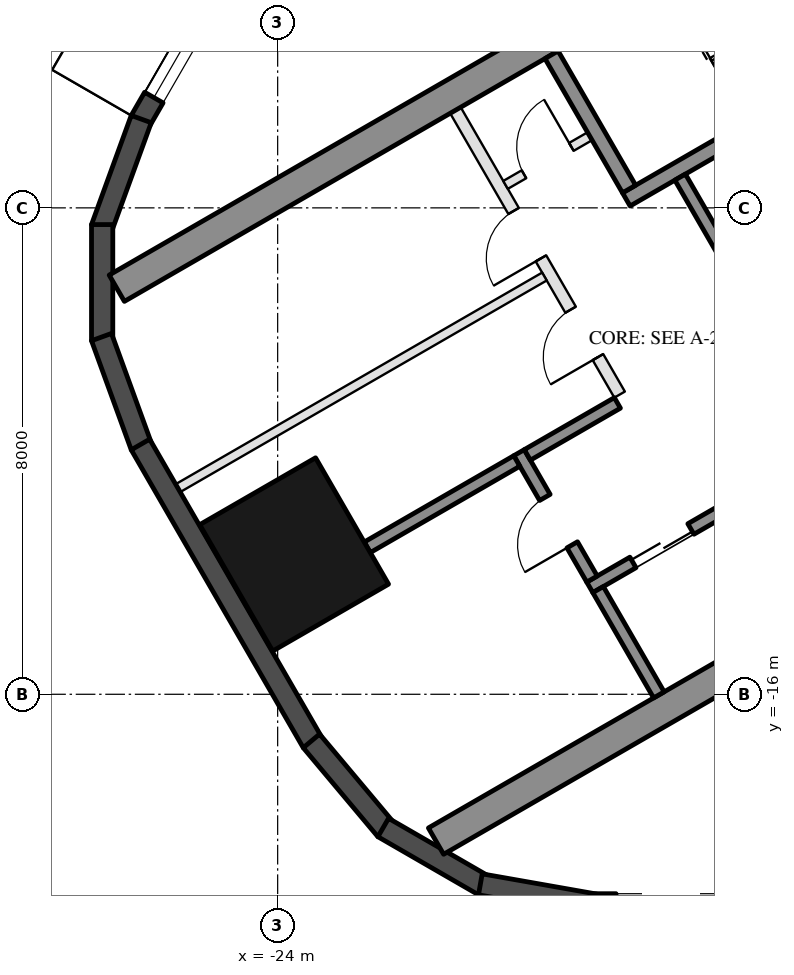
"""IFC4 building model, lengths in metres.
Left out: names, types, materials, properties, quantities, classifications, styles, units other than length and angle.
Written with IfcOpenShell. Run it as: python <this file> out.ifc"""

import sys

from ifc_helpers import new_model, si_unit, direction, frame, frame_2d, origin, origin_2d, place, context, subcontext, project, spatial, rectangle, hollow_rectangle, extrude, element, fill, save


model = new_model("IFC4")
c1 = context("Model", 3, precision=1e-05, world=origin(), true_north=direction((0.0, 1.0)))
c2 = subcontext(c1, "Body", "Model", "MODEL_VIEW")
j1 = project(units=[si_unit("LENGTHUNIT", "METRE"), si_unit("PLANEANGLEUNIT", "RADIAN")], contexts=[c1])
p1 = place(None, origin())
s1 = spatial("IfcSite", under=j1, at=p1, CompositionType="ELEMENT")
p2 = place(p1, origin())
s2 = spatial("IfcBuilding", under=s1, at=p2, CompositionType="ELEMENT")
p3 = place(p2, frame((0.0, 0.0, 179.9)))
s3 = spatial("IfcBuildingStorey", under=s2, at=p3, CompositionType="ELEMENT", Elevation=179.9)
p4 = place(p3, frame((-23.729, -13.7, 0.0), z_axis=(0.0, 0.0, 1.0), x_axis=(-0.5, 0.866025403784, 0.0)))
e1 = element("IfcColumn", 1, at=p4, inside=s3, PredefinedType="COLUMN", context=c2, shape_type="SweptSolid", body=[
    extrude(hollow_rectangle(XDim=2.4, YDim=2.2, WallThickness=0.06, at=origin_2d()), origin(), (0.0, 0.0, 1.0), 3.7),
])
p5 = place(p3, frame((-24.299, -3.176, 0.0), z_axis=(0.0, 0.0, 1.0), x_axis=(-0.500028278809, -0.866009076391, 0.0)))
e2 = element("IfcWall", 2, at=p5, inside=s3, PredefinedType="SOLIDWALL", context=c2, shape_type="SweptSolid", body=[
    extrude(rectangle(XDim=3.916, YDim=0.35, at=frame_2d((1.958, 0.0))), origin(), (0.0, 0.0, 1.0), 3.55),
])
p6 = place(p5, frame((1.675, 0.0, 0.3)))
e3 = element("IfcOpeningElement", 3, at=p6, cuts=e2, PredefinedType="OPENING", context=c2, shape_type="SweptSolid", body=[
    extrude(rectangle(XDim=1.8, YDim=2.65, at=frame_2d((0.9, 1.325))), frame((0.0, 0.185, 0.0), z_axis=(0.0, -1.0, 0.0), x_axis=(1.0, 0.0, 0.0)), (0.0, 0.0, 1.0), 0.37),
])
for number, where, z_axis, x_axis in (
    (4, (-26.244, -6.54, 0.0), (0.0, 0.0, 1.0), (-0.342, -0.94, 0.0)),
    (5, (-26.886, -8.275, 0.0), (0.0, 0.0, 1.0), (0.0, -1.0, 0.0)),
    (6, (-26.897, -10.125, 0.0), (0.0, 0.0, 1.0), (0.342, -0.94, 0.0)),
):
    element("IfcWall", number, at=place(p3, frame(where, z_axis=z_axis, x_axis=x_axis)), inside=s3, PredefinedType="SOLIDWALL", context=c2, shape_type="SweptSolid", body=[
        extrude(rectangle(XDim=1.91, YDim=0.35, at=frame_2d((0.955, 0.0))), origin(), (0.0, 0.0, 1.0), 3.55),
    ])
p7 = place(p3, frame((-26.257, -11.893, 0.0), z_axis=(0.0, 0.0, 1.0), x_axis=(0.500018773155, -0.866014564827, 0.0)))
e7 = element("IfcWall", 7, at=p7, inside=s3, PredefinedType="SOLIDWALL", context=c2, shape_type="SweptSolid", body=[
    extrude(rectangle(XDim=5.658, YDim=0.35, at=frame_2d((2.829, 0.0))), origin(), (0.0, 0.0, 1.0), 3.55),
])
for number, where, z_axis, x_axis in (
    (8, (-23.445, -16.768, 0.0), (0.0, 0.0, 1.0), (0.643, -0.766, 0.0)),
    (9, (-22.264, -18.192, 0.0), (0.0, 0.0, 1.0), (0.866, -0.5, 0.0)),
):
    element("IfcWall", number, at=place(p3, frame(where, z_axis=z_axis, x_axis=x_axis)), inside=s3, PredefinedType="SOLIDWALL", context=c2, shape_type="SweptSolid", body=[
        extrude(rectangle(XDim=1.91, YDim=0.35, at=frame_2d((0.955, 0.0))), origin(), (0.0, 0.0, 1.0), 3.55),
    ])
p8 = place(p3, frame((-20.667, -19.126, 0.0), z_axis=(0.0, 0.0, 1.0), x_axis=(0.984798995425, -0.173697837091, 0.0)))
e10 = element("IfcWall", 10, at=p8, inside=s3, PredefinedType="SOLIDWALL", context=c2, shape_type="SweptSolid", body=[
    extrude(rectangle(XDim=1.91, YDim=0.35, at=frame_2d((0.955, 0.0))), origin(), (0.0, 0.0, 1.0), 3.55),
])
p9 = place(p3, frame((-18.816, -19.455, 0.0), z_axis=(0.0, 0.0, 1.0), x_axis=(1.0, 0.0, 0.0)))
e11 = element("IfcWall", 11, at=p9, inside=s3, PredefinedType="SOLIDWALL", context=c2, shape_type="SweptSolid", body=[
    extrude(rectangle(XDim=11.816, YDim=0.35, at=frame_2d((5.908, 0.0))), origin(), (0.0, 0.0, 1.0), 3.55),
])
p10 = place(p9, frame((0.381, 0.0, 0.3)))
e12 = element("IfcOpeningElement", 12, at=p10, cuts=e11, PredefinedType="OPENING", context=c2, shape_type="SweptSolid", body=[
    extrude(rectangle(XDim=1.8, YDim=2.65, at=frame_2d((0.9, 1.325))), frame((0.0, 0.185, 0.0), z_axis=(0.0, -1.0, 0.0), x_axis=(1.0, 0.0, 0.0)), (0.0, 0.0, 1.0), 0.37),
])
p11 = place(p9, frame((7.74, 0.0, 0.0)))
e13 = element("IfcOpeningElement", 13, at=p11, cuts=e11, PredefinedType="OPENING", context=c2, shape_type="SweptSolid", body=[
    extrude(rectangle(XDim=2.4, YDim=2.4, at=frame_2d((1.2, 1.2))), frame((0.0, 0.185, 0.0), z_axis=(0.0, -1.0, 0.0), x_axis=(1.0, 0.0, 0.0)), (0.0, 0.0, 1.0), 0.37),
])
p12 = place(p9, frame((3.791, 0.0, 0.3)))
e14 = element("IfcOpeningElement", 14, at=p12, cuts=e11, PredefinedType="OPENING", context=c2, shape_type="SweptSolid", body=[
    extrude(rectangle(XDim=1.6, YDim=2.65, at=frame_2d((0.8, 1.325))), frame((0.0, 0.185, 0.0), z_axis=(0.0, -1.0, 0.0), x_axis=(1.0, 0.0, 0.0)), (0.0, 0.0, 1.0), 0.37),
])
p13 = place(p9, frame((5.691, 0.0, 0.3)))
e15 = element("IfcOpeningElement", 15, at=p13, cuts=e11, PredefinedType="OPENING", context=c2, shape_type="SweptSolid", body=[
    extrude(rectangle(XDim=1.6, YDim=2.65, at=frame_2d((0.8, 1.325))), frame((0.0, 0.185, 0.0), z_axis=(0.0, -1.0, 0.0), x_axis=(1.0, 0.0, 0.0)), (0.0, 0.0, 1.0), 0.37),
])
for number, where, z_axis, x_axis in (
    (16, (-13.797, -1.903, 0.0), (0.0, 0.0, 1.0), (-0.866, -0.5, 0.0)),
    (17, (-8.547, -10.997, 0.0), (0.0, 0.0, 1.0), (-0.866, -0.5, 0.0)),
):
    element("IfcWall", number, at=place(p3, frame(where, z_axis=z_axis, x_axis=x_axis)), inside=s3, PredefinedType="SHEAR", context=c2, shape_type="SweptSolid", body=[
        extrude(rectangle(XDim=14.837, YDim=0.5, at=frame_2d((7.418, 0.0))), origin(), (0.0, 0.0, 1.0), 3.5),
    ])
p14 = place(p3, frame((-12.681, -4.636, 0.0), z_axis=(0.0, 0.0, 1.0), x_axis=(-0.866021702275, -0.500006411147, 0.0)))
e18 = element("IfcWall", 18, at=p14, inside=s3, PredefinedType="SHEAR", context=c2, shape_type="SweptSolid", body=[
    extrude(rectangle(XDim=6.45, YDim=0.25, at=frame_2d((3.225, 0.0))), origin(), (0.0, 0.0, 1.0), 3.5),
])
p15 = place(p14, frame((0.3, 0.0, 0.0)))
e19 = element("IfcOpeningElement", 19, at=p15, cuts=e18, PredefinedType="OPENING", context=c2, shape_type="SweptSolid", body=[
    extrude(rectangle(XDim=1.0, YDim=2.1, at=frame_2d((0.5, 1.05))), frame((0.0, 0.135, 0.0), z_axis=(0.0, -1.0, 0.0), x_axis=(1.0, 0.0, 0.0)), (0.0, 0.0, 1.0), 0.27),
])
p16 = place(p3, frame((-19.496, -5.482, 0.0), z_axis=(0.0, 0.0, 1.0), x_axis=(0.499990435942, -0.866030925526, 0.0)))
e20 = element("IfcWall", 20, at=p16, inside=s3, PredefinedType="SHEAR", context=c2, shape_type="SweptSolid", body=[
    extrude(rectangle(XDim=2.55, YDim=0.25, at=frame_2d((1.275, 0.0))), origin(), (0.0, 0.0, 1.0), 3.5),
])
p17 = place(p3, frame((-17.381, -7.495, 0.0), z_axis=(0.0, 0.0, 1.0), x_axis=(0.500011755427, -0.866018616679, 0.0)))
e21 = element("IfcWall", 21, at=p17, inside=s3, PredefinedType="SHEAR", context=c2, shape_type="SweptSolid", body=[
    extrude(rectangle(XDim=2.8, YDim=0.2, at=frame_2d((1.4, 0.0))), origin(), (0.0, 0.0, 1.0), 3.5),
])
p18 = place(p3, frame((-10.068, -9.162, 0.0), z_axis=(0.0, 0.0, 1.0), x_axis=(-0.866032725843, -0.499987317609, 0.0)))
e22 = element("IfcWall", 22, at=p18, inside=s3, PredefinedType="SHEAR", context=c2, shape_type="SweptSolid", body=[
    extrude(rectangle(XDim=10.16, YDim=0.2, at=frame_2d((5.08, 0.0))), origin(), (0.0, 0.0, 1.0), 3.5),
])
p19 = place(p18, frame((0.62, 0.0, 0.0)))
e23 = element("IfcOpeningElement", 23, at=p19, cuts=e22, PredefinedType="OPENING", context=c2, shape_type="SweptSolid", body=[
    extrude(rectangle(XDim=1.1, YDim=2.1, at=frame_2d((0.55, 1.05))), frame((0.0, 0.11, 0.0), z_axis=(0.0, -1.0, 0.0), x_axis=(1.0, 0.0, 0.0)), (0.0, 0.0, 1.0), 0.22),
])
p20 = place(p18, frame((3.16, 0.0, 0.0)))
e24 = element("IfcOpeningElement", 24, at=p20, cuts=e22, PredefinedType="OPENING", context=c2, shape_type="SweptSolid", body=[
    extrude(rectangle(XDim=1.1, YDim=2.1, at=frame_2d((0.55, 1.05))), frame((0.0, 0.11, 0.0), z_axis=(0.0, -1.0, 0.0), x_axis=(1.0, 0.0, 0.0)), (0.0, 0.0, 1.0), 0.22),
])
p21 = place(p18, frame((5.7, 0.0, 0.0)))
e25 = element("IfcOpeningElement", 25, at=p21, cuts=e22, PredefinedType="OPENING", context=c2, shape_type="SweptSolid", body=[
    extrude(rectangle(XDim=1.1, YDim=2.1, at=frame_2d((0.55, 1.05))), frame((0.0, 0.11, 0.0), z_axis=(0.0, -1.0, 0.0), x_axis=(1.0, 0.0, 0.0)), (0.0, 0.0, 1.0), 0.22),
])
p22 = place(p18, frame((8.24, 0.0, 0.0)))
e26 = element("IfcOpeningElement", 26, at=p22, cuts=e22, PredefinedType="OPENING", context=c2, shape_type="SweptSolid", body=[
    extrude(rectangle(XDim=1.1, YDim=2.1, at=frame_2d((0.55, 1.05))), frame((0.0, 0.11, 0.0), z_axis=(0.0, -1.0, 0.0), x_axis=(1.0, 0.0, 0.0)), (0.0, 0.0, 1.0), 0.22),
])
p23 = place(p3, frame((-20.031, -12.026, 0.0), z_axis=(0.0, 0.0, 1.0), x_axis=(0.500033551112, -0.866006032174, 0.0)))
e27 = element("IfcWall", 27, at=p23, inside=s3, PredefinedType="SHEAR", context=c2, shape_type="SweptSolid", body=[
    extrude(rectangle(XDim=2.4, YDim=0.2, at=frame_2d((1.2, 0.0))), origin(), (0.0, 0.0, 1.0), 3.5),
])
p24 = place(p23, frame((0.85, 0.0, 0.0)))
e28 = element("IfcOpeningElement", 28, at=p24, cuts=e27, PredefinedType="OPENING", context=c2, shape_type="SweptSolid", body=[
    extrude(rectangle(XDim=0.9, YDim=2.1, at=frame_2d((0.45, 1.05))), frame((0.0, 0.11, 0.0), z_axis=(0.0, -1.0, 0.0), x_axis=(1.0, 0.0, 0.0)), (0.0, 0.0, 1.0), 0.22),
])
p25 = place(p3, frame((-18.413, -11.208, 0.0), z_axis=(0.0, 0.0, 1.0), x_axis=(-0.866038183914, -0.499977863513, 0.0)))
e29 = element("IfcWall", 29, at=p25, inside=s3, PredefinedType="SHEAR", context=c2, shape_type="SweptSolid", body=[
    extrude(rectangle(XDim=1.71, YDim=0.2, at=frame_2d((0.855, 0.0))), origin(), (0.0, 0.0, 1.0), 3.5),
])
p26 = place(p3, frame((-18.73, -14.278, 0.0), z_axis=(0.0, 0.0, 1.0), x_axis=(0.50002537861, -0.866010750942, 0.0)))
e30 = element("IfcWall", 30, at=p26, inside=s3, PredefinedType="SHEAR", context=c2, shape_type="SweptSolid", body=[
    extrude(rectangle(XDim=2.0, YDim=0.2, at=frame_2d((1.0, 0.0))), origin(), (0.0, 0.0, 1.0), 3.5),
])
p27 = place(p3, frame((-20.067, -12.163, 0.0), z_axis=(0.0, 0.0, 1.0), x_axis=(-0.866055327414, -0.49994816717, 0.0)))
e31 = element("IfcWall", 31, at=p27, inside=s3, PredefinedType="SHEAR", context=c2, shape_type="SweptSolid", body=[
    extrude(rectangle(XDim=2.84, YDim=0.2, at=frame_2d((1.42, 0.0))), origin(), (0.0, 0.0, 1.0), 3.5),
])
p28 = place(p3, frame((-21.076, -6.395, 0.0), z_axis=(0.0, 0.0, 1.0), x_axis=(0.50001468107, -0.866016927499, 0.0)))
e32 = element("IfcWall", 32, at=p28, inside=s3, PredefinedType="PARTITIONING", context=c2, shape_type="SweptSolid", body=[
    extrude(rectangle(XDim=5.4, YDim=0.2, at=frame_2d((2.7, 0.0))), origin(), (0.0, 0.0, 1.0), 3.5),
])
p29 = place(p28, frame((1.913, 0.0, 0.0)))
e33 = element("IfcOpeningElement", 33, at=p29, cuts=e32, PredefinedType="OPENING", context=c2, shape_type="SweptSolid", body=[
    extrude(rectangle(XDim=0.9, YDim=2.1, at=frame_2d((0.45, 1.05))), frame((0.0, 0.11, 0.0), z_axis=(0.0, -1.0, 0.0), x_axis=(1.0, 0.0, 0.0)), (0.0, 0.0, 1.0), 0.22),
])
p30 = place(p28, frame((3.788, 0.0, 0.0)))
e34 = element("IfcOpeningElement", 34, at=p30, cuts=e32, PredefinedType="OPENING", context=c2, shape_type="SweptSolid", body=[
    extrude(rectangle(XDim=0.9, YDim=2.1, at=frame_2d((0.45, 1.05))), frame((0.0, 0.11, 0.0), z_axis=(0.0, -1.0, 0.0), x_axis=(1.0, 0.0, 0.0)), (0.0, 0.0, 1.0), 0.22),
])
p31 = place(p3, frame((-18.866, -6.822, 0.0), z_axis=(0.0, 0.0, 1.0), x_axis=(-0.866028054938, -0.499995408039, 0.0)))
e35 = element("IfcWall", 35, at=p31, inside=s3, PredefinedType="PARTITIONING", context=c2, shape_type="SweptSolid", body=[
    extrude(rectangle(XDim=1.6, YDim=0.15, at=frame_2d((0.8, 0.0))), origin(), (0.0, 0.0, 1.0), 3.5),
])
p32 = place(p31, frame((0.35, 0.0, 0.0)))
e36 = element("IfcOpeningElement", 36, at=p32, cuts=e35, PredefinedType="OPENING", context=c2, shape_type="SweptSolid", body=[
    extrude(rectangle(XDim=0.9, YDim=2.1, at=frame_2d((0.45, 1.05))), frame((0.0, 0.085, 0.0), z_axis=(0.0, -1.0, 0.0), x_axis=(1.0, 0.0, 0.0)), (0.0, 0.0, 1.0), 0.17),
])
p33 = place(p3, frame((-19.613, -9.13, 0.0), z_axis=(0.0, 0.0, 1.0), x_axis=(-0.866031734426, -0.499989034847, 0.0)))
e37 = element("IfcWall", 37, at=p33, inside=s3, PredefinedType="PARTITIONING", context=c2, shape_type="SweptSolid", body=[
    extrude(rectangle(XDim=6.95, YDim=0.15, at=frame_2d((3.475, 0.0))), origin(), (0.0, 0.0, 1.0), 3.5),
])
p34 = place(p6, origin())
e38 = element("IfcWindow", 38, at=p34, inside=s3, PartitioningType="SINGLE_PANEL", PredefinedType="WINDOW", context=c2, shape_type="SweptSolid", body=[
    extrude(rectangle(XDim=1.8, YDim=2.65, at=frame_2d((0.9, 1.325))), frame((0.0, 0.03, 0.0), z_axis=(0.0, -1.0, 0.0), x_axis=(1.0, 0.0, 0.0)), (0.0, 0.0, 1.0), 0.06),
])
fill(e3, e38)
p35 = place(p32, frame((0.9, 0.0, 0.0), z_axis=(0.0, 0.0, 1.0), x_axis=(-1.0, 0.0, 0.0)))
e39 = element("IfcDoor", 39, at=p35, inside=s3, OperationType="SINGLE_SWING_RIGHT", PredefinedType="DOOR", context=c2, shape_type="SweptSolid", body=[
    extrude(rectangle(XDim=0.9, YDim=2.1, at=frame_2d((0.45, 1.05))), frame((0.0, 0.025, 0.0), z_axis=(0.0, -1.0, 0.0), x_axis=(1.0, 0.0, 0.0)), (0.0, 0.0, 1.0), 0.05),
])
fill(e36, e39)
p36 = place(p22, origin())
e40 = element("IfcDoor", 40, at=p36, inside=s3, OperationType="DOUBLE_DOOR_SLIDING", PredefinedType="DOOR", context=c2, shape_type="SweptSolid", body=[
    extrude(rectangle(XDim=1.1, YDim=2.1, at=frame_2d((0.55, 1.05))), frame((0.0, 0.025, 0.0), z_axis=(0.0, -1.0, 0.0), x_axis=(1.0, 0.0, 0.0)), (0.0, 0.0, 1.0), 0.05),
])
fill(e26, e40)
p37 = place(p24, frame((0.9, 0.0, 0.0), z_axis=(0.0, 0.0, 1.0), x_axis=(-1.0, 0.0, 0.0)))
e41 = element("IfcDoor", 41, at=p37, inside=s3, OperationType="SINGLE_SWING_LEFT", PredefinedType="DOOR", context=c2, shape_type="SweptSolid", body=[
    extrude(rectangle(XDim=0.9, YDim=2.1, at=frame_2d((0.45, 1.05))), frame((0.0, 0.025, 0.0), z_axis=(0.0, -1.0, 0.0), x_axis=(1.0, 0.0, 0.0)), (0.0, 0.0, 1.0), 0.05),
])
fill(e28, e41)
p38 = place(p29, frame((0.9, 0.0, 0.0), z_axis=(0.0, 0.0, 1.0), x_axis=(-1.0, 0.0, 0.0)))
e42 = element("IfcDoor", 42, at=p38, inside=s3, OperationType="SINGLE_SWING_LEFT", PredefinedType="DOOR", context=c2, shape_type="SweptSolid", body=[
    extrude(rectangle(XDim=0.9, YDim=2.1, at=frame_2d((0.45, 1.05))), frame((0.0, 0.025, 0.0), z_axis=(0.0, -1.0, 0.0), x_axis=(1.0, 0.0, 0.0)), (0.0, 0.0, 1.0), 0.05),
])
fill(e33, e42)
p39 = place(p30, frame((0.9, 0.0, 0.0), z_axis=(0.0, 0.0, 1.0), x_axis=(-1.0, 0.0, 0.0)))
e43 = element("IfcDoor", 43, at=p39, inside=s3, OperationType="SINGLE_SWING_LEFT", PredefinedType="DOOR", context=c2, shape_type="SweptSolid", body=[
    extrude(rectangle(XDim=0.9, YDim=2.1, at=frame_2d((0.45, 1.05))), frame((0.0, 0.025, 0.0), z_axis=(0.0, -1.0, 0.0), x_axis=(1.0, 0.0, 0.0)), (0.0, 0.0, 1.0), 0.05),
])
fill(e34, e43)
save(model, sys.argv[1])
